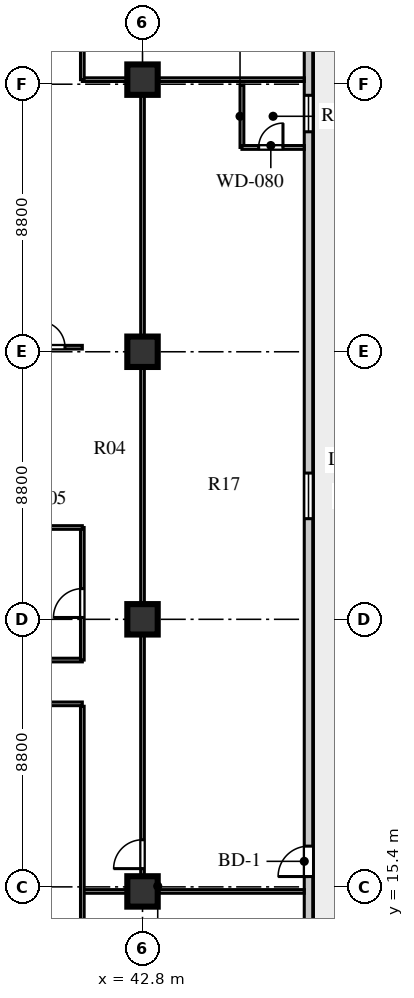
"""IFC4 building model, lengths in metres.
Left out: names, types, materials, properties, quantities, classifications, styles, units other than length and angle.
Written with IfcOpenShell. Run it as: python <this file> out.ifc"""

import sys

from ifc_helpers import new_model, si_unit, direction, frame, frame_2d, origin, origin_2d, place, context, subcontext, project, spatial, rectangle, extrude, element, fill, save


model = new_model("IFC4")
c1 = context("Model", 3, precision=1e-05, world=origin(), true_north=direction((0.0, 1.0)))
c2 = subcontext(c1, "Body", "Model", "MODEL_VIEW")
j1 = project(units=[si_unit("LENGTHUNIT", "METRE"), si_unit("PLANEANGLEUNIT", "RADIAN")], contexts=[c1])
p1 = place(None, origin())
s1 = spatial("IfcSite", under=j1, at=p1, CompositionType="ELEMENT")
p2 = place(p1, origin())
s2 = spatial("IfcBuilding", under=s1, at=p2, CompositionType="ELEMENT")
p3 = place(p2, frame((0.0, 0.0, 111.7)))
s3 = spatial("IfcBuildingStorey", under=s2, at=p3, CompositionType="ELEMENT", Elevation=111.7)
for number, where, z_axis, x_axis in (
    (1, (42.8, 15.25, 0.0), (0.0, 0.0, 1.0), (1.0, 0.0, 0.0)),
    (2, (42.8, 24.2, 0.0), (0.0, 0.0, 1.0), (1.0, 0.0, 0.0)),
    (3, (42.8, 33.0, 0.0), (0.0, 0.0, 1.0), (1.0, 0.0, 0.0)),
    (4, (42.8, 41.95, 0.0), (0.0, 0.0, 1.0), (1.0, 0.0, 0.0)),
):
    element("IfcColumn", number, at=place(p3, frame(where, z_axis=z_axis, x_axis=x_axis)), inside=s3, PredefinedType="COLUMN", context=c2, shape_type="SweptSolid", body=[
        extrude(rectangle(XDim=1.0, YDim=1.0, at=origin_2d()), origin(), (0.0, 0.0, 1.0), 3.6),
    ])
p4 = place(p3, frame((48.26, 13.33, 0.0), z_axis=(0.0, 0.0, 1.0), x_axis=(0.0, 1.0, 0.0)))
e5 = element("IfcWall", 5, at=p4, inside=s3, PredefinedType="STANDARD", context=c2, shape_type="SweptSolid", body=[
    extrude(rectangle(XDim=30.54, YDim=0.28, at=frame_2d((15.27, 0.0))), origin(), (0.0, 0.0, 1.0), 3.6),
])
p5 = place(p4, frame((2.41, 0.0, 0.0)))
e6 = element("IfcOpeningElement", 6, at=p5, cuts=e5, PredefinedType="OPENING", context=c2, shape_type="SweptSolid", body=[
    extrude(rectangle(XDim=1.0, YDim=2.05, at=frame_2d((0.5, 1.025))), frame((0.0, 0.15, 0.0), z_axis=(0.0, -1.0, 0.0), x_axis=(1.0, 0.0, 0.0)), (0.0, 0.0, 1.0), 0.3),
])
p6 = place(p4, frame((14.18, 0.0, 0.8)))
e7 = element("IfcOpeningElement", 7, at=p6, cuts=e5, PredefinedType="OPENING", context=c2, shape_type="SweptSolid", body=[
    extrude(rectangle(XDim=1.5, YDim=2.0, at=frame_2d((0.75, 1.0))), frame((0.0, 0.15, 0.0), z_axis=(0.0, -1.0, 0.0), x_axis=(1.0, 0.0, 0.0)), (0.0, 0.0, 1.0), 0.3),
])
p7 = place(p4, frame((26.905, 0.0, 0.8)))
e8 = element("IfcOpeningElement", 8, at=p7, cuts=e5, PredefinedType="OPENING", context=c2, shape_type="SweptSolid", body=[
    extrude(rectangle(XDim=1.2, YDim=1.75, at=frame_2d((0.6, 0.875))), frame((0.0, 0.15, 0.0), z_axis=(0.0, -1.0, 0.0), x_axis=(1.0, 0.0, 0.0)), (0.0, 0.0, 1.0), 0.3),
])
p8 = place(p3, frame((25.22, 21.42, 0.0), z_axis=(0.0, 0.0, 1.0), x_axis=(1.0, 0.0, 0.0)))
e9 = element("IfcWall", 9, at=p8, inside=s3, PredefinedType="PARTITIONING", context=c2, shape_type="SweptSolid", body=[
    extrude(rectangle(XDim=15.6, YDim=0.12, at=frame_2d((7.8, 0.0))), origin(), (0.0, 0.0, 1.0), 3.2),
])
p9 = place(p8, frame((0.73, 0.0, 0.0)))
e10 = element("IfcOpeningElement", 10, at=p9, cuts=e9, PredefinedType="OPENING", context=c2, shape_type="SweptSolid", body=[
    extrude(rectangle(XDim=0.95, YDim=2.1, at=frame_2d((0.475, 1.05))), frame((0.0, 0.07, 0.0), z_axis=(0.0, -1.0, 0.0), x_axis=(1.0, 0.0, 0.0)), (0.0, 0.0, 1.0), 0.14),
])
p10 = place(p3, frame((27.15, 22.86, 0.0), z_axis=(0.0, 0.0, 1.0), x_axis=(1.0, 0.0, 0.0)))
e11 = element("IfcWall", 11, at=p10, inside=s3, PredefinedType="PARTITIONING", context=c2, shape_type="SweptSolid", body=[
    extrude(rectangle(XDim=13.67, YDim=0.12, at=frame_2d((6.835, 0.0))), origin(), (0.0, 0.0, 1.0), 3.6),
])
p11 = place(p10, frame((2.2, 0.0, 0.0)))
e12 = element("IfcOpeningElement", 12, at=p11, cuts=e11, PredefinedType="OPENING", context=c2, shape_type="SweptSolid", body=[
    extrude(rectangle(XDim=0.9, YDim=2.08, at=frame_2d((0.45, 1.04))), frame((0.0, 0.07, 0.0), z_axis=(0.0, -1.0, 0.0), x_axis=(1.0, 0.0, 0.0)), (0.0, 0.0, 1.0), 0.14),
])
p12 = place(p3, frame((42.8, 15.25, 0.0), z_axis=(0.0, 0.0, 1.0), x_axis=(0.0, 1.0, 0.0)))
e13 = element("IfcWall", 13, at=p12, inside=s3, PredefinedType="PARTITIONING", context=c2, shape_type="SweptSolid", body=[
    extrude(rectangle(XDim=26.7, YDim=0.12, at=frame_2d((13.35, 0.0))), origin(), (0.0, 0.0, 1.0), 2.95),
])
p13 = place(p12, frame((0.75, 0.0, 0.0)))
e14 = element("IfcOpeningElement", 14, at=p13, cuts=e13, PredefinedType="OPENING", context=c2, shape_type="SweptSolid", body=[
    extrude(rectangle(XDim=0.95, YDim=2.1, at=frame_2d((0.475, 1.05))), frame((0.0, 0.07, 0.0), z_axis=(0.0, -1.0, 0.0), x_axis=(1.0, 0.0, 0.0)), (0.0, 0.0, 1.0), 0.14),
])
for number, where, z_axis, x_axis in (
    (15, (40.82, 15.25, 0.0), (0.0, 0.0, 1.0), (1.0, 0.0, 0.0)),
    (16, (40.82, 41.95, 0.0), (0.0, 0.0, 1.0), (1.0, 0.0, 0.0)),
):
    element("IfcWall", number, at=place(p3, frame(where, z_axis=z_axis, x_axis=x_axis)), inside=s3, PredefinedType="PARTITIONING", context=c2, shape_type="SweptSolid", body=[
        extrude(rectangle(XDim=7.3, YDim=0.12, at=frame_2d((3.65, 0.0))), origin(), (0.0, 0.0, 1.0), 2.95),
    ])
p14 = place(p3, frame((40.82, 22.86, 0.0), z_axis=(0.0, 0.0, 1.0), x_axis=(0.0, 1.0, 0.0)))
e17 = element("IfcWall", 17, at=p14, inside=s3, PredefinedType="PARTITIONING", context=c2, shape_type="SweptSolid", body=[
    extrude(rectangle(XDim=4.36, YDim=0.12, at=frame_2d((2.18, 0.0))), origin(), (0.0, 0.0, 1.0), 3.6),
])
p15 = place(p14, frame((1.4, 0.0, 0.0)))
e18 = element("IfcOpeningElement", 18, at=p15, cuts=e17, PredefinedType="OPENING", context=c2, shape_type="SweptSolid", body=[
    extrude(rectangle(XDim=0.95, YDim=2.1, at=frame_2d((0.475, 1.05))), frame((0.0, 0.07, 0.0), z_axis=(0.0, -1.0, 0.0), x_axis=(1.0, 0.0, 0.0)), (0.0, 0.0, 1.0), 0.14),
])
p16 = place(p3, frame((36.9, 27.22, 0.0), z_axis=(0.0, 0.0, 1.0), x_axis=(1.0, 0.0, 0.0)))
e19 = element("IfcWall", 19, at=p16, inside=s3, PredefinedType="PARTITIONING", context=c2, shape_type="SweptSolid", body=[
    extrude(rectangle(XDim=3.92, YDim=0.12, at=frame_2d((1.96, 0.0))), origin(), (0.0, 0.0, 1.0), 3.2),
])
p17 = place(p3, frame((40.82, 10.28, 0.0), z_axis=(0.0, 0.0, 1.0), x_axis=(0.0, 1.0, 0.0)))
e20 = element("IfcWall", 20, at=p17, inside=s3, PredefinedType="PARTITIONING", context=c2, shape_type="SweptSolid", body=[
    extrude(rectangle(XDim=11.06, YDim=0.12, at=frame_2d((5.53, 0.0))), origin(), (0.0, 0.0, 1.0), 3.6),
])
p18 = place(p3, frame((46.07, 39.72, 0.0), z_axis=(0.0, 0.0, 1.0), x_axis=(0.0, 1.0, 0.0)))
e21 = element("IfcWall", 21, at=p18, inside=s3, PredefinedType="PLUMBINGWALL", context=c2, shape_type="SweptSolid", body=[
    extrude(rectangle(XDim=2.05, YDim=0.125, at=frame_2d((1.025, 0.0))), origin(), (0.0, 0.0, 1.0), 3.6),
])
p19 = place(p3, frame((46.07, 39.72, 0.0), z_axis=(0.0, 0.0, 1.0), x_axis=(1.0, 0.0, 0.0)))
e22 = element("IfcWall", 22, at=p19, inside=s3, PredefinedType="PLUMBINGWALL", context=c2, shape_type="SweptSolid", body=[
    extrude(rectangle(XDim=2.05, YDim=0.125, at=frame_2d((1.025, 0.0))), origin(), (0.0, 0.0, 1.0), 3.6),
])
p20 = place(p19, frame((0.55, 0.0, 0.0)))
e23 = element("IfcOpeningElement", 23, at=p20, cuts=e22, PredefinedType="OPENING", context=c2, shape_type="SweptSolid", body=[
    extrude(rectangle(XDim=0.8, YDim=2.05, at=frame_2d((0.4, 1.025))), frame((0.0, 0.073, 0.0), z_axis=(0.0, -1.0, 0.0), x_axis=(1.0, 0.0, 0.0)), (0.0, 0.0, 1.0), 0.145),
])
p21 = place(p3, frame((38.95, 33.15, 0.0), z_axis=(0.0, 0.0, 1.0), x_axis=(1.0, 0.0, 0.0)))
e24 = element("IfcWall", 24, at=p21, inside=s3, PredefinedType="PARTITIONING", context=c2, shape_type="SweptSolid", body=[
    extrude(rectangle(XDim=1.87, YDim=0.12, at=frame_2d((0.935, 0.0))), origin(), (0.0, 0.0, 1.0), 3.6),
])
p22 = place(p21, frame((0.45, 0.0, 0.0)))
e25 = element("IfcOpeningElement", 25, at=p22, cuts=e24, PredefinedType="OPENING", context=c2, shape_type="SweptSolid", body=[
    extrude(rectangle(XDim=0.85, YDim=2.05, at=frame_2d((0.425, 1.025))), frame((0.0, 0.07, 0.0), z_axis=(0.0, -1.0, 0.0), x_axis=(1.0, 0.0, 0.0)), (0.0, 0.0, 1.0), 0.14),
])
p23 = place(p3, frame((40.82, 41.95, 0.0), z_axis=(0.0, 0.0, 1.0), x_axis=(0.0, 1.0, 0.0)))
e26 = element("IfcWall", 26, at=p23, inside=s3, PredefinedType="PARTITIONING", context=c2, shape_type="SweptSolid", body=[
    extrude(rectangle(XDim=4.97, YDim=0.12, at=frame_2d((2.485, 0.0))), origin(), (0.0, 0.0, 1.0), 3.6),
])
p24 = place(p5, frame((1.0, 0.0, 0.0), z_axis=(0.0, 0.0, 1.0), x_axis=(-1.0, 0.0, 0.0)))
e27 = element("IfcDoor", 27, at=p24, inside=s3, OperationType="SINGLE_SWING_RIGHT", PredefinedType="DOOR", context=c2, shape_type="SweptSolid", body=[
    extrude(rectangle(XDim=1.0, YDim=2.05, at=frame_2d((0.5, 1.025))), frame((0.0, 0.025, 0.0), z_axis=(0.0, -1.0, 0.0), x_axis=(1.0, 0.0, 0.0)), (0.0, 0.0, 1.0), 0.05),
])
fill(e6, e27)
p25 = place(p6, origin())
e28 = element("IfcWindow", 28, at=p25, inside=s3, PartitioningType="SINGLE_PANEL", PredefinedType="WINDOW", context=c2, shape_type="SweptSolid", body=[
    extrude(rectangle(XDim=1.5, YDim=2.0, at=frame_2d((0.75, 1.0))), frame((0.0, 0.03, 0.0), z_axis=(0.0, -1.0, 0.0), x_axis=(1.0, 0.0, 0.0)), (0.0, 0.0, 1.0), 0.06),
])
fill(e7, e28)
p26 = place(p7, origin())
e29 = element("IfcWindow", 29, at=p26, inside=s3, PartitioningType="SINGLE_PANEL", PredefinedType="WINDOW", context=c2, shape_type="SweptSolid", body=[
    extrude(rectangle(XDim=1.2, YDim=1.75, at=frame_2d((0.6, 0.875))), frame((0.0, 0.03, 0.0), z_axis=(0.0, -1.0, 0.0), x_axis=(1.0, 0.0, 0.0)), (0.0, 0.0, 1.0), 0.06),
])
fill(e8, e29)
p27 = place(p15, frame((0.95, 0.0, 0.0), z_axis=(0.0, 0.0, 1.0), x_axis=(-1.0, 0.0, 0.0)))
e30 = element("IfcDoor", 30, at=p27, inside=s3, OperationType="SINGLE_SWING_RIGHT", PredefinedType="DOOR", context=c2, shape_type="SweptSolid", body=[
    extrude(rectangle(XDim=0.95, YDim=2.1, at=frame_2d((0.475, 1.05))), frame((0.0, 0.025, 0.0), z_axis=(0.0, -1.0, 0.0), x_axis=(1.0, 0.0, 0.0)), (0.0, 0.0, 1.0), 0.05),
])
fill(e18, e30)
p28 = place(p13, origin())
e31 = element("IfcDoor", 31, at=p28, inside=s3, OperationType="SINGLE_SWING_LEFT", PredefinedType="DOOR", context=c2, shape_type="SweptSolid", body=[
    extrude(rectangle(XDim=0.95, YDim=2.1, at=frame_2d((0.475, 1.05))), frame((0.0, 0.025, 0.0), z_axis=(0.0, -1.0, 0.0), x_axis=(1.0, 0.0, 0.0)), (0.0, 0.0, 1.0), 0.05),
])
fill(e14, e31)
p29 = place(p20, frame((0.8, 0.0, 0.0), z_axis=(0.0, 0.0, 1.0), x_axis=(-1.0, 0.0, 0.0)))
e32 = element("IfcDoor", 32, at=p29, inside=s3, OperationType="SINGLE_SWING_LEFT", PredefinedType="DOOR", context=c2, shape_type="SweptSolid", body=[
    extrude(rectangle(XDim=0.8, YDim=2.05, at=frame_2d((0.4, 1.025))), frame((0.0, 0.025, 0.0), z_axis=(0.0, -1.0, 0.0), x_axis=(1.0, 0.0, 0.0)), (0.0, 0.0, 1.0), 0.05),
])
fill(e23, e32)
p30 = place(p22, origin())
e33 = element("IfcDoor", 33, at=p30, inside=s3, OperationType="SINGLE_SWING_LEFT", PredefinedType="DOOR", context=c2, shape_type="SweptSolid", body=[
    extrude(rectangle(XDim=0.85, YDim=2.05, at=frame_2d((0.425, 1.025))), frame((0.0, 0.025, 0.0), z_axis=(0.0, -1.0, 0.0), x_axis=(1.0, 0.0, 0.0)), (0.0, 0.0, 1.0), 0.05),
])
fill(e25, e33)
save(model, sys.argv[1])
